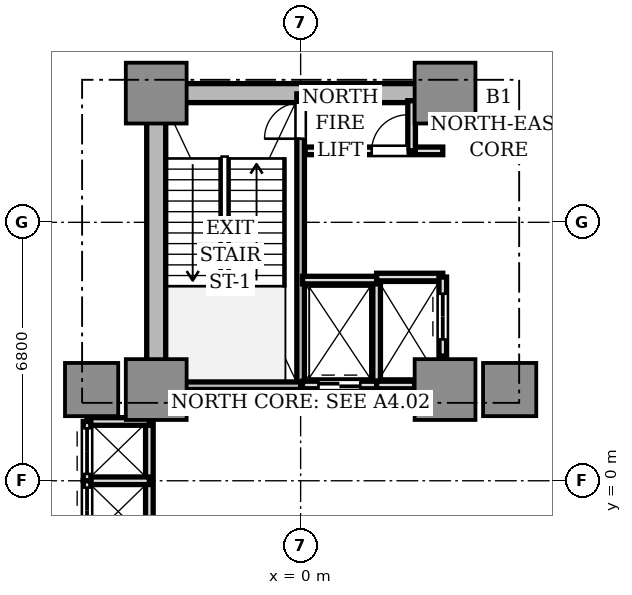
"""IFC4 building model, lengths in metres.
Left out: names, types, materials, properties, quantities, classifications, styles, units other than length and angle.
Written with IfcOpenShell. Run it as: python <this file> out.ifc"""

import sys

from ifc_helpers import new_model, si_unit, direction, frame, frame_2d, origin, origin_2d, place, context, subcontext, project, spatial, rectangle, extrude, source, transform, mapped, element, fill, save


model = new_model("IFC4")
c1 = context("Model", 3, precision=1e-05, world=origin(), true_north=direction((0.0, 1.0)))
c2 = subcontext(c1, "Body", "Model", "MODEL_VIEW")
j1 = project(units=[si_unit("LENGTHUNIT", "METRE"), si_unit("PLANEANGLEUNIT", "RADIAN")], contexts=[c1])
p1 = place(None, origin())
s1 = spatial("IfcSite", under=j1, at=p1, CompositionType="ELEMENT")
p2 = place(p1, origin())
s2 = spatial("IfcBuilding", under=s1, at=p2, CompositionType="ELEMENT")
p3 = place(p2, frame((0.0, 0.0, -4.5)))
s3 = spatial("IfcBuildingStorey", under=s2, at=p3, CompositionType="ELEMENT", Elevation=-4.5)
p4 = place(p3, frame((-3.55, 10.2, 0.0), z_axis=(0.0, 0.0, 1.0), x_axis=(1.0, 0.0, 0.0)))
e1 = element("IfcWall", 1, at=p4, inside=s3, PredefinedType="SHEAR", context=c2, shape_type="SweptSolid", body=[
    extrude(rectangle(XDim=7.1, YDim=0.5, at=frame_2d((3.55, 0.0))), origin(), (0.0, 0.0, 1.0), 4.1),
])
p5 = place(p3, frame((-3.8, 2.85, 0.0), z_axis=(0.0, 0.0, 1.0), x_axis=(0.0, 1.0, 0.0)))
e2 = element("IfcWall", 2, at=p5, inside=s3, PredefinedType="SHEAR", context=c2, shape_type="SweptSolid", body=[
    extrude(rectangle(XDim=6.9, YDim=0.5, at=frame_2d((3.45, 0.0))), origin(), (0.0, 0.0, 1.0), 4.1),
])
m1 = source(origin(), c2, "Body", "SweptSolid", [
    extrude(rectangle(XDim=1.6, YDim=1.6, at=origin_2d()), origin(), (0.0, 0.0, 1.0), 4.1),
])
for number, where, z_axis, x_axis in (
    (3, (-3.8, 2.4, 0.0), (0.0, 0.0, 1.0), (1.0, 0.0, 0.0)),
    (4, (3.8, 2.4, 0.0), (0.0, 0.0, 1.0), (1.0, 0.0, 0.0)),
    (5, (-3.8, 10.2, 0.0), (0.0, 0.0, 1.0), (1.0, 0.0, 0.0)),
    (6, (3.8, 10.2, 0.0), (0.0, 0.0, 1.0), (1.0, 0.0, 0.0)),
):
    element("IfcColumn", number, at=place(p3, frame(where, z_axis=z_axis, x_axis=x_axis)), inside=s3, PredefinedType="COLUMN", context=c2, shape_type="MappedRepresentation", body=[
        mapped(m1, transform((0.0, 0.0, 0.0), scale=1.0)),
    ])
m2 = source(origin(), c2, "Body", "SweptSolid", [
    extrude(rectangle(XDim=1.4, YDim=1.4, at=origin_2d()), origin(), (0.0, 0.0, 1.0), 4.1),
])
for number, where, z_axis, x_axis in (
    (7, (5.5, 2.4, 0.0), (0.0, 0.0, 1.0), (1.0, 0.0, 0.0)),
    (8, (-5.5, 2.4, 0.0), (0.0, 0.0, 1.0), (1.0, 0.0, 0.0)),
):
    element("IfcColumn", number, at=place(p3, frame(where, z_axis=z_axis, x_axis=x_axis)), inside=s3, PredefinedType="COLUMN", context=c2, shape_type="MappedRepresentation", body=[
        mapped(m2, transform((0.0, 0.0, 0.0), scale=1.0)),
    ])
p6 = place(p3, frame((0.0, 2.5, 0.0), z_axis=(0.0, 0.0, 1.0), x_axis=(0.0, 1.0, 0.0)))
e9 = element("IfcWall", 9, at=p6, inside=s3, PredefinedType="SOLIDWALL", context=c2, shape_type="SweptSolid", body=[
    extrude(rectangle(XDim=7.68, YDim=0.2, at=frame_2d((3.84, 0.0))), origin(), (0.0, 0.0, 1.0), 4.1),
])
p7 = place(p6, frame((6.5, 0.0, 0.0)))
e10 = element("IfcOpeningElement", 10, at=p7, cuts=e9, PredefinedType="OPENING", context=c2, shape_type="SweptSolid", body=[
    extrude(rectangle(XDim=0.95, YDim=2.15, at=frame_2d((0.475, 1.075))), frame((0.0, 0.11, 0.0), z_axis=(0.0, -1.0, 0.0), x_axis=(1.0, 0.0, 0.0)), (0.0, 0.0, 1.0), 0.22),
])
p8 = place(p3, frame((-3.72, 2.5, 0.0), z_axis=(0.0, 0.0, 1.0), x_axis=(1.0, 0.0, 0.0)))
e11 = element("IfcWall", 11, at=p8, inside=s3, PredefinedType="SOLIDWALL", context=c2, shape_type="SweptSolid", body=[
    extrude(rectangle(XDim=3.72, YDim=0.2, at=frame_2d((1.86, 0.0))), origin(), (0.0, 0.0, 1.0), 4.1),
])
p9 = place(p3, frame((2.0, 2.5, 0.0), z_axis=(0.0, 0.0, 1.0), x_axis=(0.0, 1.0, 0.0)))
e12 = element("IfcWall", 12, at=p9, inside=s3, PredefinedType="SOLIDWALL", context=c2, shape_type="SweptSolid", body=[
    extrude(rectangle(XDim=2.78, YDim=0.2, at=frame_2d((1.39, 0.0))), origin(), (0.0, 0.0, 1.0), 3.65),
])
p10 = place(p3, frame((0.05, 5.28, 0.0), z_axis=(0.0, 0.0, 1.0), x_axis=(1.0, 0.0, 0.0)))
e13 = element("IfcWall", 13, at=p10, inside=s3, PredefinedType="SOLIDWALL", context=c2, shape_type="SweptSolid", body=[
    extrude(rectangle(XDim=1.95, YDim=0.2, at=frame_2d((0.975, 0.0))), origin(), (0.0, 0.0, 1.0), 3.65),
])
p11 = place(p3, frame((0.05, 2.52, 0.0), z_axis=(0.0, 0.0, 1.0), x_axis=(1.0, 0.0, 0.0)))
e14 = element("IfcWall", 14, at=p11, inside=s3, PredefinedType="SOLIDWALL", context=c2, shape_type="SweptSolid", body=[
    extrude(rectangle(XDim=1.95, YDim=0.2, at=frame_2d((0.975, 0.0))), origin(), (0.0, 0.0, 1.0), 3.65),
])
p12 = place(p11, frame((0.42, 0.0, 0.0)))
e15 = element("IfcOpeningElement", 15, at=p12, cuts=e14, PredefinedType="OPENING", context=c2, shape_type="SweptSolid", body=[
    extrude(rectangle(XDim=1.1, YDim=2.2, at=frame_2d((0.55, 1.1))), frame((0.0, 0.11, 0.0), z_axis=(0.0, -1.0, 0.0), x_axis=(1.0, 0.0, 0.0)), (0.0, 0.0, 1.0), 0.22),
])
p13 = place(p3, frame((2.0, 2.52, 0.0), z_axis=(0.0, 0.0, 1.0), x_axis=(1.0, 0.0, 0.0)))
e16 = element("IfcWall", 16, at=p13, inside=s3, PredefinedType="SOLIDWALL", context=c2, shape_type="SweptSolid", body=[
    extrude(rectangle(XDim=1.0, YDim=0.2, at=frame_2d((0.5, 0.0))), origin(), (0.0, 0.0, 1.0), 3.65),
])
p14 = place(p3, frame((2.0, 5.36, 0.0), z_axis=(0.0, 0.0, 1.0), x_axis=(1.0, 0.0, 0.0)))
e17 = element("IfcWall", 17, at=p14, inside=s3, PredefinedType="SOLIDWALL", context=c2, shape_type="SweptSolid", body=[
    extrude(rectangle(XDim=1.74, YDim=0.2, at=frame_2d((0.87, 0.0))), origin(), (0.0, 0.0, 1.0), 3.65),
])
p15 = place(p3, frame((3.74, 3.28, 0.0), z_axis=(0.0, 0.0, 1.0), x_axis=(0.0, 1.0, 0.0)))
e18 = element("IfcWall", 18, at=p15, inside=s3, PredefinedType="SOLIDWALL", context=c2, shape_type="SweptSolid", body=[
    extrude(rectangle(XDim=2.08, YDim=0.2, at=frame_2d((1.04, 0.0))), origin(), (0.0, 0.0, 1.0), 3.65),
])
p16 = place(p15, frame((0.44, 0.0, 0.0)))
e19 = element("IfcOpeningElement", 19, at=p16, cuts=e18, PredefinedType="OPENING", context=c2, shape_type="SweptSolid", body=[
    extrude(rectangle(XDim=1.2, YDim=2.2, at=frame_2d((0.6, 1.1))), frame((0.0, 0.11, 0.0), z_axis=(0.0, -1.0, 0.0), x_axis=(1.0, 0.0, 0.0)), (0.0, 0.0, 1.0), 0.22),
])
p17 = place(p3, frame((-3.98, -1.56, 0.0), z_axis=(0.0, 0.0, 1.0), x_axis=(0.0, 1.0, 0.0)))
e20 = element("IfcWall", 20, at=p17, inside=s3, PredefinedType="SOLIDWALL", context=c2, shape_type="SweptSolid", body=[
    extrude(rectangle(XDim=3.12, YDim=0.2, at=frame_2d((1.56, 0.0))), origin(), (0.0, 0.0, 1.0), 3.17),
])
for number, where, z_axis, x_axis in (
    (21, (-5.62, 1.56, 0.0), (0.0, 0.0, 1.0), (1.0, 0.0, 0.0)),
    (22, (-5.62, 0.0, 0.0), (0.0, 0.0, 1.0), (1.0, 0.0, 0.0)),
):
    element("IfcWall", number, at=place(p3, frame(where, z_axis=z_axis, x_axis=x_axis)), inside=s3, PredefinedType="SOLIDWALL", context=c2, shape_type="SweptSolid", body=[
        extrude(rectangle(XDim=1.64, YDim=0.2, at=frame_2d((0.82, 0.0))), origin(), (0.0, 0.0, 1.0), 3.65),
    ])
p18 = place(p3, frame((-5.62, 0.0, 0.0), z_axis=(0.0, 0.0, 1.0), x_axis=(0.0, 1.0, 0.0)))
e23 = element("IfcWall", 23, at=p18, inside=s3, PredefinedType="SOLIDWALL", context=c2, shape_type="SweptSolid", body=[
    extrude(rectangle(XDim=1.56, YDim=0.2, at=frame_2d((0.78, 0.0))), origin(), (0.0, 0.0, 1.0), 3.65),
])
p19 = place(p18, frame((0.18, 0.0, 0.0)))
e24 = element("IfcOpeningElement", 24, at=p19, cuts=e23, PredefinedType="OPENING", context=c2, shape_type="SweptSolid", body=[
    extrude(rectangle(XDim=1.2, YDim=2.2, at=frame_2d((0.6, 1.1))), frame((0.0, 0.11, 0.0), z_axis=(0.0, -1.0, 0.0), x_axis=(1.0, 0.0, 0.0)), (0.0, 0.0, 1.0), 0.22),
])
p20 = place(p3, frame((-5.62, -1.56, 0.0), z_axis=(0.0, 0.0, 1.0), x_axis=(0.0, 1.0, 0.0)))
e25 = element("IfcWall", 25, at=p20, inside=s3, PredefinedType="SOLIDWALL", context=c2, shape_type="SweptSolid", body=[
    extrude(rectangle(XDim=1.56, YDim=0.2, at=frame_2d((0.78, 0.0))), origin(), (0.0, 0.0, 1.0), 3.65),
])
p21 = place(p20, frame((0.18, 0.0, 0.0)))
e26 = element("IfcOpeningElement", 26, at=p21, cuts=e25, PredefinedType="OPENING", context=c2, shape_type="SweptSolid", body=[
    extrude(rectangle(XDim=1.2, YDim=2.2, at=frame_2d((0.6, 1.1))), frame((0.0, 0.11, 0.0), z_axis=(0.0, -1.0, 0.0), x_axis=(1.0, 0.0, 0.0)), (0.0, 0.0, 1.0), 0.22),
])
p22 = place(p3, frame((0.12, 8.68, 0.0), z_axis=(0.0, 0.0, 1.0), x_axis=(1.0, 0.0, 0.0)))
e27 = element("IfcWall", 27, at=p22, inside=s3, PredefinedType="SOLIDWALL", context=c2, shape_type="SweptSolid", body=[
    extrude(rectangle(XDim=3.62, YDim=0.2, at=frame_2d((1.81, 0.0))), origin(), (0.0, 0.0, 1.0), 3.65),
])
p23 = place(p22, frame((1.75, 0.0, 0.0)))
e28 = element("IfcOpeningElement", 28, at=p23, cuts=e27, PredefinedType="OPENING", context=c2, shape_type="SweptSolid", body=[
    extrude(rectangle(XDim=0.95, YDim=2.15, at=frame_2d((0.475, 1.075))), frame((0.0, 0.11, 0.0), z_axis=(0.0, -1.0, 0.0), x_axis=(1.0, 0.0, 0.0)), (0.0, 0.0, 1.0), 0.22),
])
p24 = place(p3, frame((2.92, 8.68, 0.0), z_axis=(0.0, 0.0, 1.0), x_axis=(0.0, 1.0, 0.0)))
e29 = element("IfcWall", 29, at=p24, inside=s3, PredefinedType="SOLIDWALL", context=c2, shape_type="SweptSolid", body=[
    extrude(rectangle(XDim=1.32, YDim=0.2, at=frame_2d((0.66, 0.0))), origin(), (0.0, 0.0, 1.0), 3.65),
])
m3 = source(origin(), c2, "Body", "SweptSolid", [
    extrude(rectangle(XDim=1.1, YDim=0.05, at=origin_2d()), origin(), (0.0, 0.0, 1.0), 2.2),
])
p25 = place(p12, frame((0.55, 0.0, 0.0)))
e30 = element("IfcDoor", 30, at=p25, inside=s3, OperationType="DOUBLE_DOOR_SLIDING", PredefinedType="DOOR", context=c2, shape_type="MappedRepresentation", body=[
    mapped(m3, transform((0.0, 0.0, 0.0), scale=1.0)),
])
fill(e15, e30)
m4 = source(origin(), c2, "Body", "SweptSolid", [
    extrude(rectangle(XDim=1.2, YDim=0.05, at=origin_2d()), origin(), (0.0, 0.0, 1.0), 2.2),
])
p26 = place(p16, frame((0.6, 0.0, 0.0)))
e31 = element("IfcDoor", 31, at=p26, inside=s3, OperationType="DOUBLE_DOOR_SLIDING", PredefinedType="DOOR", context=c2, shape_type="MappedRepresentation", body=[
    mapped(m4, transform((0.0, 0.0, 0.0), scale=1.0)),
])
fill(e19, e31)
p27 = place(p19, frame((0.6, 0.0, 0.0)))
e32 = element("IfcDoor", 32, at=p27, inside=s3, OperationType="DOUBLE_DOOR_SLIDING", PredefinedType="DOOR", context=c2, shape_type="MappedRepresentation", body=[
    mapped(m4, transform((0.0, 0.0, 0.0), scale=1.0)),
])
fill(e24, e32)
p28 = place(p21, frame((0.6, 0.0, 0.0)))
e33 = element("IfcDoor", 33, at=p28, inside=s3, OperationType="DOUBLE_DOOR_SLIDING", PredefinedType="DOOR", context=c2, shape_type="MappedRepresentation", body=[
    mapped(m4, transform((0.0, 0.0, 0.0), scale=1.0)),
])
fill(e26, e33)
m5 = source(origin(), c2, "Body", "SweptSolid", [
    extrude(rectangle(XDim=0.95, YDim=0.05, at=origin_2d()), origin(), (0.0, 0.0, 1.0), 2.15),
])
p29 = place(p7, frame((0.475, 0.0, 0.0)))
e34 = element("IfcDoor", 34, at=p29, inside=s3, OperationType="SINGLE_SWING_LEFT", PredefinedType="DOOR", context=c2, shape_type="MappedRepresentation", body=[
    mapped(m5, transform((0.0, 0.0, 0.0), scale=1.0)),
])
fill(e10, e34)
p30 = place(p23, frame((0.475, 0.0, 0.0)))
e35 = element("IfcDoor", 35, at=p30, inside=s3, OperationType="SINGLE_SWING_RIGHT", PredefinedType="DOOR", context=c2, shape_type="MappedRepresentation", body=[
    mapped(m5, transform((0.0, 0.0, 0.0), scale=1.0)),
])
fill(e28, e35)
save(model, sys.argv[1])
